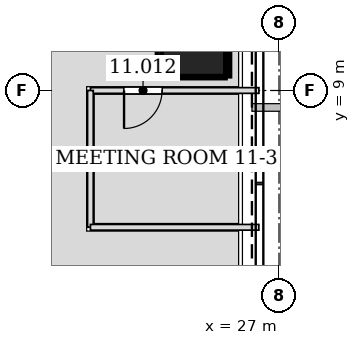
"""IFC4 building model, lengths in metres.
Left out: names, types, materials, properties, quantities, classifications, styles, units other than length and angle.
Written with IfcOpenShell. Run it as: python <this file> out.ifc"""

import sys

from ifc_helpers import new_model, si_unit, direction, frame, frame_2d, origin, origin_2d, place, context, subcontext, project, spatial, rectangle, hollow_rectangle, extrude, element, fill, save


model = new_model("IFC4")
c1 = context("Model", 3, precision=1e-05, world=origin(), true_north=direction((0.0, 1.0)))
c2 = subcontext(c1, "Body", "Model", "MODEL_VIEW")
j1 = project(units=[si_unit("LENGTHUNIT", "METRE"), si_unit("PLANEANGLEUNIT", "RADIAN")], contexts=[c1])
p1 = place(None, origin())
s1 = spatial("IfcSite", under=j1, at=p1, CompositionType="ELEMENT")
p2 = place(p1, origin())
s2 = spatial("IfcBuilding", under=s1, at=p2, CompositionType="ELEMENT")
p3 = place(p2, frame((0.0, 0.0, 54.0)))
s3 = spatial("IfcBuildingStorey", under=s2, at=p3, CompositionType="ELEMENT", Elevation=54.0)
p4 = place(p3, frame((24.809, 10.276, 0.0), z_axis=(-0.028237693676, -0.011678552323, 0.999533012997), x_axis=(0.382183844423, -0.924086310396, 0.0)))
e1 = element("IfcColumn", 1, at=p4, inside=s3, PredefinedType="COLUMN", context=c2, shape_type="SweptSolid", body=[
    extrude(hollow_rectangle(XDim=1.8, YDim=1.8, WallThickness=0.085, at=origin_2d()), origin(), (0.0, 0.0, 1.0), 4.202),
])
p5 = place(p3, frame((26.471, 9.0, 0.0), z_axis=(0.0, 0.0, 1.0), x_axis=(-1.0, 0.0, 0.0)))
e2 = element("IfcWall", 2, at=p5, inside=s3, PredefinedType="PARTITIONING", context=c2, shape_type="SweptSolid", body=[
    extrude(rectangle(XDim=4.434, YDim=0.15, at=frame_2d((2.217, 0.0))), origin(), (0.0, 0.0, 1.0), 3.418),
])
p6 = place(p5, frame((2.549, 0.0, 0.0)))
e3 = element("IfcOpeningElement", 3, at=p6, cuts=e2, PredefinedType="OPENING", context=c2, shape_type="SweptSolid", body=[
    extrude(rectangle(XDim=1.0, YDim=2.1, at=frame_2d((0.5, 1.05))), frame((0.0, 0.085, 0.0), z_axis=(0.0, -1.0, 0.0), x_axis=(1.0, 0.0, 0.0)), (0.0, 0.0, 1.0), 0.17),
])
p7 = place(p3, frame((22.037, 9.0, 0.0), z_axis=(0.0, 0.0, 1.0), x_axis=(0.0, -1.0, 0.0)))
e4 = element("IfcWall", 4, at=p7, inside=s3, PredefinedType="PARTITIONING", context=c2, shape_type="SweptSolid", body=[
    extrude(rectangle(XDim=3.6, YDim=0.15, at=frame_2d((1.8, 0.0))), origin(), (0.0, 0.0, 1.0), 4.035),
])
p8 = place(p3, frame((22.037, 5.4, 0.0), z_axis=(0.0, 0.0, 1.0), x_axis=(1.0, 0.0, 0.0)))
e5 = element("IfcWall", 5, at=p8, inside=s3, PredefinedType="PARTITIONING", context=c2, shape_type="SweptSolid", body=[
    extrude(rectangle(XDim=4.432, YDim=0.15, at=frame_2d((2.216, 0.0))), origin(), (0.0, 0.0, 1.0), 3.418),
])
p9 = place(p6, origin())
e6 = element("IfcDoor", 6, at=p9, inside=s3, OperationType="SINGLE_SWING_RIGHT", PredefinedType="DOOR", context=c2, shape_type="SweptSolid", body=[
    extrude(rectangle(XDim=1.0, YDim=2.1, at=frame_2d((0.5, 1.05))), frame((0.0, 0.025, 0.0), z_axis=(0.0, -1.0, 0.0), x_axis=(1.0, 0.0, 0.0)), (0.0, 0.0, 1.0), 0.05),
])
fill(e3, e6)
save(model, sys.argv[1])
